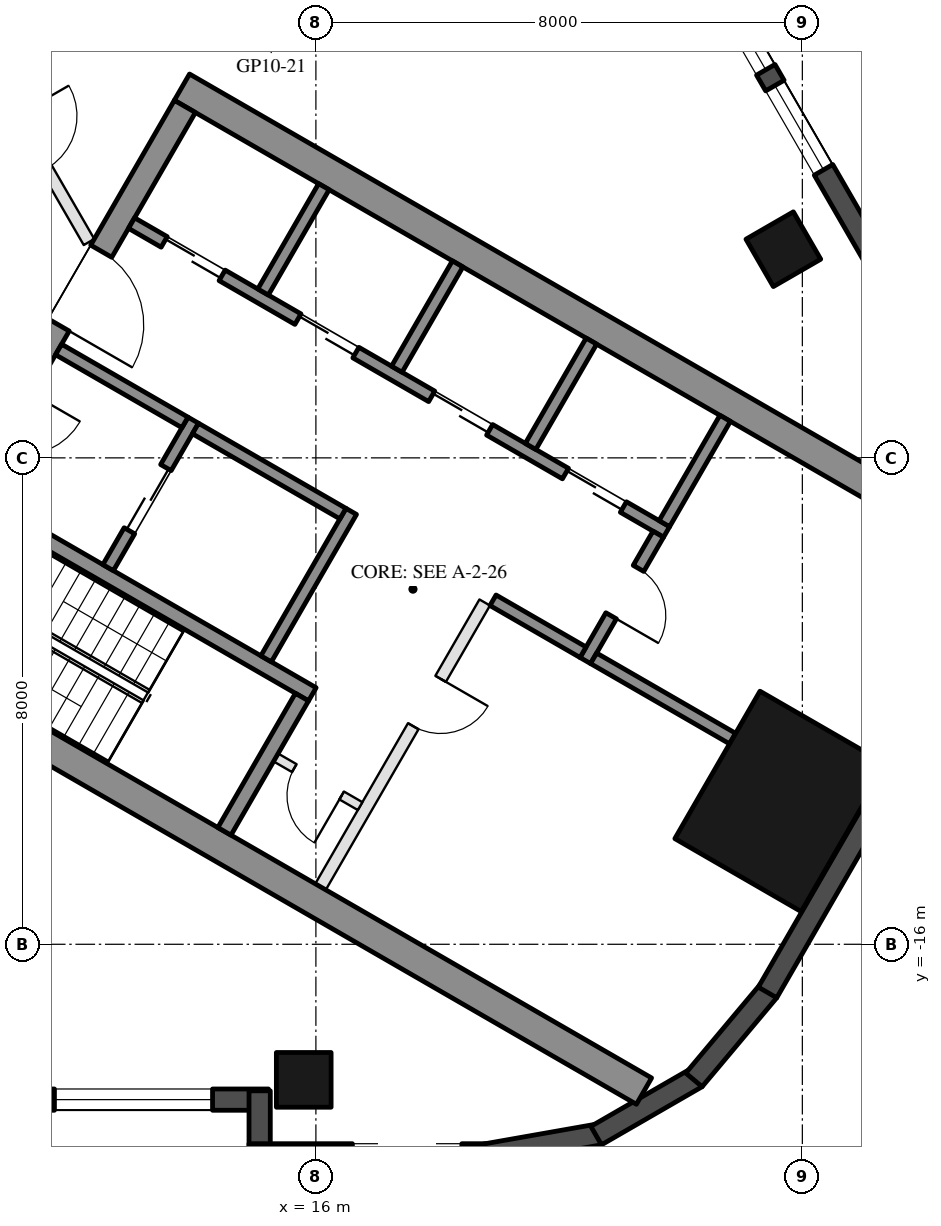
"""IFC4 building model, lengths in metres.
Left out: names, types, materials, properties, quantities, classifications, styles, units other than length and angle.
Written with IfcOpenShell. Run it as: python <this file> out.ifc"""

import sys

from ifc_helpers import new_model, si_unit, direction, frame, frame_2d, origin, origin_2d, place, context, subcontext, project, spatial, rectangle, hollow_rectangle, extrude, element, fill, save


model = new_model("IFC4")
c1 = context("Model", 3, precision=1e-05, world=origin(), true_north=direction((0.0, 1.0)))
c2 = subcontext(c1, "Body", "Model", "MODEL_VIEW")
j1 = project(units=[si_unit("LENGTHUNIT", "METRE"), si_unit("PLANEANGLEUNIT", "RADIAN")], contexts=[c1])
p1 = place(None, origin())
s1 = spatial("IfcSite", under=j1, at=p1, CompositionType="ELEMENT")
p2 = place(p1, origin())
s2 = spatial("IfcBuilding", under=s1, at=p2, CompositionType="ELEMENT")
p3 = place(p2, frame((0.0, 0.0, 116.8)))
s3 = spatial("IfcBuildingStorey", under=s2, at=p3, CompositionType="ELEMENT", Elevation=116.8)
for number, where, z_axis, x_axis in (
    (1, (15.8, -18.23, 0.0), (0.0, 0.0, 1.0), (-1.0, 0.0, 0.0)),
    (2, (23.688, -4.568, 0.0), (0.0, 0.0, 1.0), (-0.5, 0.866, 0.0)),
):
    element("IfcColumn", number, at=place(p3, frame(where, z_axis=z_axis, x_axis=x_axis)), inside=s3, PredefinedType="COLUMN", context=c2, shape_type="SweptSolid", body=[
        extrude(hollow_rectangle(XDim=0.9, YDim=0.9, WallThickness=0.04, at=origin_2d()), origin(), (0.0, 0.0, 1.0), 3.7),
    ])
p4 = place(p3, frame((23.643, -13.65, 0.0), z_axis=(0.0, 0.0, 1.0), x_axis=(0.5, 0.866025403784, 0.0)))
e3 = element("IfcColumn", 3, at=p4, inside=s3, PredefinedType="COLUMN", context=c2, shape_type="SweptSolid", body=[
    extrude(hollow_rectangle(XDim=2.8, YDim=2.4, WallThickness=0.07, at=origin_2d()), origin(), (0.0, 0.0, 1.0), 3.7),
])
p5 = place(p3, frame((8.48, -18.555, 0.0), z_axis=(0.0, 0.0, 1.0), x_axis=(1.0, 0.0, 0.0)))
e4 = element("IfcWall", 4, at=p5, inside=s3, PredefinedType="SOLIDWALL", context=c2, shape_type="SweptSolid", body=[
    extrude(rectangle(XDim=6.74, YDim=0.35, at=frame_2d((3.37, 0.0))), origin(), (0.0, 0.0, 1.0), 3.55),
])
p6 = place(p5, frame((0.32, 0.0, 0.3)))
e5 = element("IfcOpeningElement", 5, at=p6, cuts=e4, PredefinedType="OPENING", context=c2, shape_type="SweptSolid", body=[
    extrude(rectangle(XDim=2.6, YDim=2.65, at=frame_2d((1.3, 1.325))), frame((0.0, 0.185, 0.0), z_axis=(0.0, -1.0, 0.0), x_axis=(1.0, 0.0, 0.0)), (0.0, 0.0, 1.0), 0.37),
])
p7 = place(p5, frame((3.22, 0.0, 0.3)))
e6 = element("IfcOpeningElement", 6, at=p7, cuts=e4, PredefinedType="OPENING", context=c2, shape_type="SweptSolid", body=[
    extrude(rectangle(XDim=2.6, YDim=2.65, at=frame_2d((1.3, 1.325))), frame((0.0, 0.185, 0.0), z_axis=(0.0, -1.0, 0.0), x_axis=(1.0, 0.0, 0.0)), (0.0, 0.0, 1.0), 0.37),
])
p8 = place(p3, frame((15.075, -18.41, 0.0), z_axis=(0.0, 0.0, 1.0), x_axis=(0.0, -1.0, 0.0)))
e7 = element("IfcWall", 7, at=p8, inside=s3, PredefinedType="SOLIDWALL", context=c2, shape_type="SweptSolid", body=[
    extrude(rectangle(XDim=1.22, YDim=0.35, at=frame_2d((0.61, 0.0))), origin(), (0.0, 0.0, 1.0), 3.55),
])
p9 = place(p3, frame((14.9, -19.455, 0.0), z_axis=(0.0, 0.0, 1.0), x_axis=(1.0, 0.0, 0.0)))
e8 = element("IfcWall", 8, at=p9, inside=s3, PredefinedType="SOLIDWALL", context=c2, shape_type="SweptSolid", body=[
    extrude(rectangle(XDim=3.916, YDim=0.35, at=frame_2d((1.958, 0.0))), origin(), (0.0, 0.0, 1.0), 3.55),
])
p10 = place(p9, frame((1.7, 0.0, 0.3)))
e9 = element("IfcOpeningElement", 9, at=p10, cuts=e8, PredefinedType="OPENING", context=c2, shape_type="SweptSolid", body=[
    extrude(rectangle(XDim=1.8, YDim=2.65, at=frame_2d((0.9, 1.325))), frame((0.0, 0.185, 0.0), z_axis=(0.0, -1.0, 0.0), x_axis=(1.0, 0.0, 0.0)), (0.0, 0.0, 1.0), 0.37),
])
p11 = place(p3, frame((18.785, -19.458, 0.0), z_axis=(0.0, 0.0, 1.0), x_axis=(0.984798995425, 0.173697837091, 0.0)))
e10 = element("IfcWall", 10, at=p11, inside=s3, PredefinedType="SOLIDWALL", context=c2, shape_type="SweptSolid", body=[
    extrude(rectangle(XDim=1.91, YDim=0.35, at=frame_2d((0.955, 0.0))), origin(), (0.0, 0.0, 1.0), 3.55),
])
for number, where, z_axis, x_axis in (
    (11, (20.61, -19.147, 0.0), (0.0, 0.0, 1.0), (0.866, 0.5, 0.0)),
    (12, (22.217, -18.231, 0.0), (0.0, 0.0, 1.0), (0.643, 0.766, 0.0)),
):
    element("IfcWall", number, at=place(p3, frame(where, z_axis=z_axis, x_axis=x_axis)), inside=s3, PredefinedType="SOLIDWALL", context=c2, shape_type="SweptSolid", body=[
        extrude(rectangle(XDim=1.91, YDim=0.35, at=frame_2d((0.955, 0.0))), origin(), (0.0, 0.0, 1.0), 3.55),
    ])
p12 = place(p3, frame((23.427, -16.792, 0.0), z_axis=(0.0, 0.0, 1.0), x_axis=(0.500018773155, 0.866014564827, 0.0)))
e13 = element("IfcWall", 13, at=p12, inside=s3, PredefinedType="SOLIDWALL", context=c2, shape_type="SweptSolid", body=[
    extrude(rectangle(XDim=5.658, YDim=0.35, at=frame_2d((2.829, 0.0))), origin(), (0.0, 0.0, 1.0), 3.55),
])
p13 = place(p3, frame((26.257, -6.567, 0.0), z_axis=(0.0, 0.0, 1.0), x_axis=(-0.500023526245, 0.866011820475, 0.0)))
e14 = element("IfcWall", 14, at=p13, inside=s3, PredefinedType="SOLIDWALL", context=c2, shape_type="SweptSolid", body=[
    extrude(rectangle(XDim=11.816, YDim=0.35, at=frame_2d((5.908, 0.0))), origin(), (0.0, 0.0, 1.0), 3.55),
])
p14 = place(p13, frame((0.38, 0.0, 0.3)))
e15 = element("IfcOpeningElement", 15, at=p14, cuts=e14, PredefinedType="OPENING", context=c2, shape_type="SweptSolid", body=[
    extrude(rectangle(XDim=1.8, YDim=2.65, at=frame_2d((0.9, 1.325))), frame((0.0, 0.185, 0.0), z_axis=(0.0, -1.0, 0.0), x_axis=(1.0, 0.0, 0.0)), (0.0, 0.0, 1.0), 0.37),
])
p15 = place(p13, frame((7.716, 0.0, 0.0)))
e16 = element("IfcOpeningElement", 16, at=p15, cuts=e14, PredefinedType="OPENING", context=c2, shape_type="SweptSolid", body=[
    extrude(rectangle(XDim=2.4, YDim=2.4, at=frame_2d((1.2, 1.2))), frame((0.0, 0.185, 0.0), z_axis=(0.0, -1.0, 0.0), x_axis=(1.0, 0.0, 0.0)), (0.0, 0.0, 1.0), 0.37),
])
p16 = place(p13, frame((3.816, 0.0, 0.3)))
e17 = element("IfcOpeningElement", 17, at=p16, cuts=e14, PredefinedType="OPENING", context=c2, shape_type="SweptSolid", body=[
    extrude(rectangle(XDim=1.6, YDim=2.65, at=frame_2d((0.8, 1.325))), frame((0.0, 0.185, 0.0), z_axis=(0.0, -1.0, 0.0), x_axis=(1.0, 0.0, 0.0)), (0.0, 0.0, 1.0), 0.37),
])
p17 = place(p13, frame((5.716, 0.0, 0.3)))
e18 = element("IfcOpeningElement", 18, at=p17, cuts=e14, PredefinedType="OPENING", context=c2, shape_type="SweptSolid", body=[
    extrude(rectangle(XDim=1.6, YDim=2.65, at=frame_2d((0.8, 1.325))), frame((0.0, 0.185, 0.0), z_axis=(0.0, -1.0, 0.0), x_axis=(1.0, 0.0, 0.0)), (0.0, 0.0, 1.0), 0.37),
])
for number, where, z_axis, x_axis in (
    (19, (8.547, -10.997, 0.0), (0.0, 0.0, 1.0), (0.866, -0.5, 0.0)),
    (20, (13.797, -1.903, 0.0), (0.0, 0.0, 1.0), (0.866, -0.5, 0.0)),
):
    element("IfcWall", number, at=place(p3, frame(where, z_axis=z_axis, x_axis=x_axis)), inside=s3, PredefinedType="SHEAR", context=c2, shape_type="SweptSolid", body=[
        extrude(rectangle(XDim=14.837, YDim=0.5, at=frame_2d((7.418, 0.0))), origin(), (0.0, 0.0, 1.0), 3.5),
    ])
p18 = place(p3, frame((8.845, -10.88, 0.0), z_axis=(0.0, 0.0, 1.0), x_axis=(0.500004234368, 0.866022959057, 0.0)))
e21 = element("IfcWall", 21, at=p18, inside=s3, PredefinedType="SHEAR", context=c2, shape_type="SweptSolid", body=[
    extrude(rectangle(XDim=10.0, YDim=0.4, at=frame_2d((5.0, 0.0))), origin(), (0.0, 0.0, 1.0), 3.5),
])
p19 = place(p18, frame((3.55, 0.0, 0.0)))
e22 = element("IfcOpeningElement", 22, at=p19, cuts=e21, PredefinedType="OPENING", context=c2, shape_type="SweptSolid", body=[
    extrude(rectangle(XDim=1.1, YDim=2.1, at=frame_2d((0.55, 1.05))), frame((0.0, 0.21, 0.0), z_axis=(0.0, -1.0, 0.0), x_axis=(1.0, 0.0, 0.0)), (0.0, 0.0, 1.0), 0.42),
])
p20 = place(p18, frame((5.85, 0.0, 0.0)))
e23 = element("IfcOpeningElement", 23, at=p20, cuts=e21, PredefinedType="OPENING", context=c2, shape_type="SweptSolid", body=[
    extrude(rectangle(XDim=1.4, YDim=2.1, at=frame_2d((0.7, 1.05))), frame((0.0, 0.21, 0.0), z_axis=(0.0, -1.0, 0.0), x_axis=(1.0, 0.0, 0.0)), (0.0, 0.0, 1.0), 0.42),
])
p21 = place(p3, frame((10.356, -8.664, 0.0), z_axis=(0.0, 0.0, 1.0), x_axis=(0.866028629588, -0.499994412703, 0.0)))
e24 = element("IfcWall", 24, at=p21, inside=s3, PredefinedType="SHEAR", context=c2, shape_type="SweptSolid", body=[
    extrude(rectangle(XDim=6.45, YDim=0.25, at=frame_2d((3.225, 0.0))), origin(), (0.0, 0.0, 1.0), 3.5),
])
p22 = place(p21, frame((0.3, 0.0, 0.0)))
e25 = element("IfcOpeningElement", 25, at=p22, cuts=e24, PredefinedType="OPENING", context=c2, shape_type="SweptSolid", body=[
    extrude(rectangle(XDim=1.0, YDim=2.1, at=frame_2d((0.5, 1.05))), frame((0.0, 0.135, 0.0), z_axis=(0.0, -1.0, 0.0), x_axis=(1.0, 0.0, 0.0)), (0.0, 0.0, 1.0), 0.27),
])
p23 = place(p3, frame((14.496, -14.143, 0.0), z_axis=(0.0, 0.0, 1.0), x_axis=(0.500062241894, 0.865989465428, 0.0)))
e26 = element("IfcWall", 26, at=p23, inside=s3, PredefinedType="SHEAR", context=c2, shape_type="SweptSolid", body=[
    extrude(rectangle(XDim=2.55, YDim=0.25, at=frame_2d((1.275, 0.0))), origin(), (0.0, 0.0, 1.0), 3.5),
])
p24 = place(p3, frame((15.181, -11.305, 0.0), z_axis=(0.0, 0.0, 1.0), x_axis=(0.49994636267, 0.866056369097, 0.0)))
e27 = element("IfcWall", 27, at=p24, inside=s3, PredefinedType="SHEAR", context=c2, shape_type="SweptSolid", body=[
    extrude(rectangle(XDim=2.8, YDim=0.2, at=frame_2d((1.4, 0.0))), origin(), (0.0, 0.0, 1.0), 3.5),
])
p25 = place(p3, frame((12.583, -9.805, 0.0), z_axis=(0.0, 0.0, 1.0), x_axis=(0.49994636267, 0.866056369097, 0.0)))
e28 = element("IfcWall", 28, at=p25, inside=s3, PredefinedType="SHEAR", context=c2, shape_type="SweptSolid", body=[
    extrude(rectangle(XDim=2.8, YDim=0.2, at=frame_2d((1.4, 0.0))), origin(), (0.0, 0.0, 1.0), 3.5),
])
p26 = place(p25, frame((0.7, 0.0, 0.0)))
e29 = element("IfcOpeningElement", 29, at=p26, cuts=e28, PredefinedType="OPENING", context=c2, shape_type="SweptSolid", body=[
    extrude(rectangle(XDim=1.2, YDim=2.1, at=frame_2d((0.6, 1.05))), frame((0.0, 0.11, 0.0), z_axis=(0.0, -1.0, 0.0), x_axis=(1.0, 0.0, 0.0)), (0.0, 0.0, 1.0), 0.22),
])
p27 = place(p3, frame((11.768, -6.217, 0.0), z_axis=(0.0, 0.0, 1.0), x_axis=(0.866050077142, -0.499957262057, 0.0)))
e30 = element("IfcWall", 30, at=p27, inside=s3, PredefinedType="SHEAR", context=c2, shape_type="SweptSolid", body=[
    extrude(rectangle(XDim=2.4, YDim=0.2, at=frame_2d((1.2, 0.0))), origin(), (0.0, 0.0, 1.0), 3.5),
])
p28 = place(p3, frame((14.02, -7.517, 0.0), z_axis=(0.0, 0.0, 1.0), x_axis=(0.866034573852, -0.49998411664, 0.0)))
e31 = element("IfcWall", 31, at=p28, inside=s3, PredefinedType="SHEAR", context=c2, shape_type="SweptSolid", body=[
    extrude(rectangle(XDim=2.8, YDim=0.2, at=frame_2d((1.4, 0.0))), origin(), (0.0, 0.0, 1.0), 3.5),
])
p29 = place(p3, frame((12.968, -4.138, 0.0), z_axis=(0.0, 0.0, 1.0), x_axis=(0.866028328073, -0.49999493495, 0.0)))
e32 = element("IfcWall", 32, at=p29, inside=s3, PredefinedType="SHEAR", context=c2, shape_type="SweptSolid", body=[
    extrude(rectangle(XDim=10.16, YDim=0.2, at=frame_2d((5.08, 0.0))), origin(), (0.0, 0.0, 1.0), 3.5),
])
p30 = place(p29, frame((0.62, 0.0, 0.0)))
e33 = element("IfcOpeningElement", 33, at=p30, cuts=e32, PredefinedType="OPENING", context=c2, shape_type="SweptSolid", body=[
    extrude(rectangle(XDim=1.1, YDim=2.1, at=frame_2d((0.55, 1.05))), frame((0.0, 0.11, 0.0), z_axis=(0.0, -1.0, 0.0), x_axis=(1.0, 0.0, 0.0)), (0.0, 0.0, 1.0), 0.22),
])
p31 = place(p29, frame((3.16, 0.0, 0.0)))
e34 = element("IfcOpeningElement", 34, at=p31, cuts=e32, PredefinedType="OPENING", context=c2, shape_type="SweptSolid", body=[
    extrude(rectangle(XDim=1.1, YDim=2.1, at=frame_2d((0.55, 1.05))), frame((0.0, 0.11, 0.0), z_axis=(0.0, -1.0, 0.0), x_axis=(1.0, 0.0, 0.0)), (0.0, 0.0, 1.0), 0.22),
])
p32 = place(p29, frame((5.7, 0.0, 0.0)))
e35 = element("IfcOpeningElement", 35, at=p32, cuts=e32, PredefinedType="OPENING", context=c2, shape_type="SweptSolid", body=[
    extrude(rectangle(XDim=1.1, YDim=2.1, at=frame_2d((0.55, 1.05))), frame((0.0, 0.11, 0.0), z_axis=(0.0, -1.0, 0.0), x_axis=(1.0, 0.0, 0.0)), (0.0, 0.0, 1.0), 0.22),
])
p33 = place(p29, frame((8.24, 0.0, 0.0)))
e36 = element("IfcOpeningElement", 36, at=p33, cuts=e32, PredefinedType="OPENING", context=c2, shape_type="SweptSolid", body=[
    extrude(rectangle(XDim=1.1, YDim=2.1, at=frame_2d((0.55, 1.05))), frame((0.0, 0.11, 0.0), z_axis=(0.0, -1.0, 0.0), x_axis=(1.0, 0.0, 0.0)), (0.0, 0.0, 1.0), 0.22),
])
p34 = place(p3, frame((20.43, -11.333, 0.0), z_axis=(0.0, 0.0, 1.0), x_axis=(0.500001309137, 0.866024647952, 0.0)))
e37 = element("IfcWall", 37, at=p34, inside=s3, PredefinedType="SHEAR", context=c2, shape_type="SweptSolid", body=[
    extrude(rectangle(XDim=2.4, YDim=0.2, at=frame_2d((1.2, 0.0))), origin(), (0.0, 0.0, 1.0), 3.5),
])
p35 = place(p34, frame((0.85, 0.0, 0.0)))
e38 = element("IfcOpeningElement", 38, at=p35, cuts=e37, PredefinedType="OPENING", context=c2, shape_type="SweptSolid", body=[
    extrude(rectangle(XDim=0.9, YDim=2.1, at=frame_2d((0.45, 1.05))), frame((0.0, 0.11, 0.0), z_axis=(0.0, -1.0, 0.0), x_axis=(1.0, 0.0, 0.0)), (0.0, 0.0, 1.0), 0.22),
])
p36 = place(p3, frame((18.913, -10.342, 0.0), z_axis=(0.0, 0.0, 1.0), x_axis=(0.866038183914, -0.499977863513, 0.0)))
e39 = element("IfcWall", 39, at=p36, inside=s3, PredefinedType="SHEAR", context=c2, shape_type="SweptSolid", body=[
    extrude(rectangle(XDim=1.71, YDim=0.2, at=frame_2d((0.855, 0.0))), origin(), (0.0, 0.0, 1.0), 3.5),
])
for number, where, z_axis, x_axis in (
    (40, (15.131, -5.272, 0.0), (0.0, 0.0, 1.0), (0.5, 0.866, 0.0)),
    (41, (17.331, -6.542, 0.0), (0.0, 0.0, 1.0), (0.5, 0.866, 0.0)),
    (42, (19.531, -7.812, 0.0), (0.0, 0.0, 1.0), (0.5, 0.866, 0.0)),
    (43, (21.73, -9.082, 0.0), (0.0, 0.0, 1.0), (0.5, 0.866, 0.0)),
):
    element("IfcWall", number, at=place(p3, frame(where, z_axis=z_axis, x_axis=x_axis)), inside=s3, PredefinedType="SHEAR", context=c2, shape_type="SweptSolid", body=[
        extrude(rectangle(XDim=2.0, YDim=0.2, at=frame_2d((1.0, 0.0))), origin(), (0.0, 0.0, 1.0), 3.5),
    ])
p37 = place(p3, frame((20.567, -11.297, 0.0), z_axis=(0.0, 0.0, 1.0), x_axis=(0.866060851709, -0.499938597367, 0.0)))
e44 = element("IfcWall", 44, at=p37, inside=s3, PredefinedType="SHEAR", context=c2, shape_type="SweptSolid", body=[
    extrude(rectangle(XDim=2.64, YDim=0.2, at=frame_2d((1.32, 0.0))), origin(), (0.0, 0.0, 1.0), 3.5),
])
p38 = place(p3, frame((16.076, -15.055, 0.0), z_axis=(0.0, 0.0, 1.0), x_axis=(0.499995103361, 0.866028230842, 0.0)))
e45 = element("IfcWall", 45, at=p38, inside=s3, PredefinedType="PARTITIONING", context=c2, shape_type="SweptSolid", body=[
    extrude(rectangle(XDim=5.4, YDim=0.2, at=frame_2d((2.7, 0.0))), origin(), (0.0, 0.0, 1.0), 3.5),
])
p39 = place(p38, frame((3.05, 0.0, 0.0)))
e46 = element("IfcOpeningElement", 46, at=p39, cuts=e45, PredefinedType="OPENING", context=c2, shape_type="SweptSolid", body=[
    extrude(rectangle(XDim=0.9, YDim=2.1, at=frame_2d((0.45, 1.05))), frame((0.0, 0.11, 0.0), z_axis=(0.0, -1.0, 0.0), x_axis=(1.0, 0.0, 0.0)), (0.0, 0.0, 1.0), 0.22),
])
p40 = place(p3, frame((15.342, -12.928, 0.0), z_axis=(0.0, 0.0, 1.0), x_axis=(0.865989903783, -0.500061482766, 0.0)))
e47 = element("IfcWall", 47, at=p40, inside=s3, PredefinedType="PARTITIONING", context=c2, shape_type="SweptSolid", body=[
    extrude(rectangle(XDim=1.6, YDim=0.15, at=frame_2d((0.8, 0.0))), origin(), (0.0, 0.0, 1.0), 3.5),
])
p41 = place(p40, frame((0.35, 0.0, 0.0)))
e48 = element("IfcOpeningElement", 48, at=p41, cuts=e47, PredefinedType="OPENING", context=c2, shape_type="SweptSolid", body=[
    extrude(rectangle(XDim=0.9, YDim=2.1, at=frame_2d((0.45, 1.05))), frame((0.0, 0.085, 0.0), z_axis=(0.0, -1.0, 0.0), x_axis=(1.0, 0.0, 0.0)), (0.0, 0.0, 1.0), 0.17),
])
p42 = place(p3, frame((10.375, -1.169, 0.0), z_axis=(0.0, 0.0, 1.0), x_axis=(0.500055316652, -0.865993464345, 0.0)))
e49 = element("IfcWall", 49, at=p42, inside=s3, PredefinedType="PARTITIONING", context=c2, shape_type="SweptSolid", body=[
    extrude(rectangle(XDim=3.788, YDim=0.2, at=frame_2d((1.894, 0.0))), origin(), (0.0, 0.0, 1.0), 2.95),
])
p43 = place(p42, frame((1.394, 0.0, 0.0)))
e50 = element("IfcOpeningElement", 50, at=p43, cuts=e49, PredefinedType="OPENING", context=c2, shape_type="SweptSolid", body=[
    extrude(rectangle(XDim=1.0, YDim=2.1, at=frame_2d((0.5, 1.05))), frame((0.0, 0.11, 0.0), z_axis=(0.0, -1.0, 0.0), x_axis=(1.0, 0.0, 0.0)), (0.0, 0.0, 1.0), 0.22),
])
p44 = place(p7, origin())
e51 = element("IfcWindow", 51, at=p44, inside=s3, PartitioningType="SINGLE_PANEL", PredefinedType="WINDOW", context=c2, shape_type="SweptSolid", body=[
    extrude(rectangle(XDim=2.6, YDim=2.65, at=frame_2d((1.3, 1.325))), frame((0.0, 0.03, 0.0), z_axis=(0.0, -1.0, 0.0), x_axis=(1.0, 0.0, 0.0)), (0.0, 0.0, 1.0), 0.06),
])
fill(e6, e51)
p45 = place(p16, origin())
e52 = element("IfcWindow", 52, at=p45, inside=s3, PartitioningType="SINGLE_PANEL", PredefinedType="WINDOW", context=c2, shape_type="SweptSolid", body=[
    extrude(rectangle(XDim=1.6, YDim=2.65, at=frame_2d((0.8, 1.325))), frame((0.0, 0.03, 0.0), z_axis=(0.0, -1.0, 0.0), x_axis=(1.0, 0.0, 0.0)), (0.0, 0.0, 1.0), 0.06),
])
fill(e17, e52)
p46 = place(p17, origin())
e53 = element("IfcWindow", 53, at=p46, inside=s3, PartitioningType="SINGLE_PANEL", PredefinedType="WINDOW", context=c2, shape_type="SweptSolid", body=[
    extrude(rectangle(XDim=1.6, YDim=2.65, at=frame_2d((0.8, 1.325))), frame((0.0, 0.03, 0.0), z_axis=(0.0, -1.0, 0.0), x_axis=(1.0, 0.0, 0.0)), (0.0, 0.0, 1.0), 0.06),
])
fill(e18, e53)
p47 = place(p26, origin())
e54 = element("IfcDoor", 54, at=p47, inside=s3, OperationType="DOUBLE_DOOR_SLIDING", PredefinedType="DOOR", context=c2, shape_type="SweptSolid", body=[
    extrude(rectangle(XDim=1.2, YDim=2.1, at=frame_2d((0.6, 1.05))), frame((0.0, 0.025, 0.0), z_axis=(0.0, -1.0, 0.0), x_axis=(1.0, 0.0, 0.0)), (0.0, 0.0, 1.0), 0.05),
])
fill(e29, e54)
p48 = place(p41, frame((0.9, 0.0, 0.0), z_axis=(0.0, 0.0, 1.0), x_axis=(-1.0, 0.0, 0.0)))
e55 = element("IfcDoor", 55, at=p48, inside=s3, OperationType="SINGLE_SWING_LEFT", PredefinedType="DOOR", context=c2, shape_type="SweptSolid", body=[
    extrude(rectangle(XDim=0.9, YDim=2.1, at=frame_2d((0.45, 1.05))), frame((0.0, 0.025, 0.0), z_axis=(0.0, -1.0, 0.0), x_axis=(1.0, 0.0, 0.0)), (0.0, 0.0, 1.0), 0.05),
])
fill(e48, e55)
p49 = place(p30, origin())
e56 = element("IfcDoor", 56, at=p49, inside=s3, OperationType="DOUBLE_DOOR_SLIDING", PredefinedType="DOOR", context=c2, shape_type="SweptSolid", body=[
    extrude(rectangle(XDim=1.1, YDim=2.1, at=frame_2d((0.55, 1.05))), frame((0.0, 0.025, 0.0), z_axis=(0.0, -1.0, 0.0), x_axis=(1.0, 0.0, 0.0)), (0.0, 0.0, 1.0), 0.05),
])
fill(e33, e56)
p50 = place(p31, origin())
e57 = element("IfcDoor", 57, at=p50, inside=s3, OperationType="DOUBLE_DOOR_SLIDING", PredefinedType="DOOR", context=c2, shape_type="SweptSolid", body=[
    extrude(rectangle(XDim=1.1, YDim=2.1, at=frame_2d((0.55, 1.05))), frame((0.0, 0.025, 0.0), z_axis=(0.0, -1.0, 0.0), x_axis=(1.0, 0.0, 0.0)), (0.0, 0.0, 1.0), 0.05),
])
fill(e34, e57)
p51 = place(p32, origin())
e58 = element("IfcDoor", 58, at=p51, inside=s3, OperationType="DOUBLE_DOOR_SLIDING", PredefinedType="DOOR", context=c2, shape_type="SweptSolid", body=[
    extrude(rectangle(XDim=1.1, YDim=2.1, at=frame_2d((0.55, 1.05))), frame((0.0, 0.025, 0.0), z_axis=(0.0, -1.0, 0.0), x_axis=(1.0, 0.0, 0.0)), (0.0, 0.0, 1.0), 0.05),
])
fill(e35, e58)
p52 = place(p33, origin())
e59 = element("IfcDoor", 59, at=p52, inside=s3, OperationType="DOUBLE_DOOR_SLIDING", PredefinedType="DOOR", context=c2, shape_type="SweptSolid", body=[
    extrude(rectangle(XDim=1.1, YDim=2.1, at=frame_2d((0.55, 1.05))), frame((0.0, 0.025, 0.0), z_axis=(0.0, -1.0, 0.0), x_axis=(1.0, 0.0, 0.0)), (0.0, 0.0, 1.0), 0.05),
])
fill(e36, e59)
p53 = place(p35, frame((0.9, 0.0, 0.0), z_axis=(0.0, 0.0, 1.0), x_axis=(-1.0, 0.0, 0.0)))
e60 = element("IfcDoor", 60, at=p53, inside=s3, OperationType="SINGLE_SWING_RIGHT", PredefinedType="DOOR", context=c2, shape_type="SweptSolid", body=[
    extrude(rectangle(XDim=0.9, YDim=2.1, at=frame_2d((0.45, 1.05))), frame((0.0, 0.025, 0.0), z_axis=(0.0, -1.0, 0.0), x_axis=(1.0, 0.0, 0.0)), (0.0, 0.0, 1.0), 0.05),
])
fill(e38, e60)
p54 = place(p39, frame((0.9, 0.0, 0.0), z_axis=(0.0, 0.0, 1.0), x_axis=(-1.0, 0.0, 0.0)))
e61 = element("IfcDoor", 61, at=p54, inside=s3, OperationType="SINGLE_SWING_LEFT", PredefinedType="DOOR", context=c2, shape_type="SweptSolid", body=[
    extrude(rectangle(XDim=0.9, YDim=2.1, at=frame_2d((0.45, 1.05))), frame((0.0, 0.025, 0.0), z_axis=(0.0, -1.0, 0.0), x_axis=(1.0, 0.0, 0.0)), (0.0, 0.0, 1.0), 0.05),
])
fill(e46, e61)
p55 = place(p20, frame((1.4, 0.0, 0.0), z_axis=(0.0, 0.0, 1.0), x_axis=(-1.0, 0.0, 0.0)))
e62 = element("IfcDoor", 62, at=p55, inside=s3, OperationType="DOUBLE_DOOR_SINGLE_SWING", PredefinedType="DOOR", context=c2, shape_type="SweptSolid", body=[
    extrude(rectangle(XDim=1.4, YDim=2.1, at=frame_2d((0.7, 1.05))), frame((0.0, 0.025, 0.0), z_axis=(0.0, -1.0, 0.0), x_axis=(1.0, 0.0, 0.0)), (0.0, 0.0, 1.0), 0.05),
])
fill(e23, e62)
save(model, sys.argv[1])
